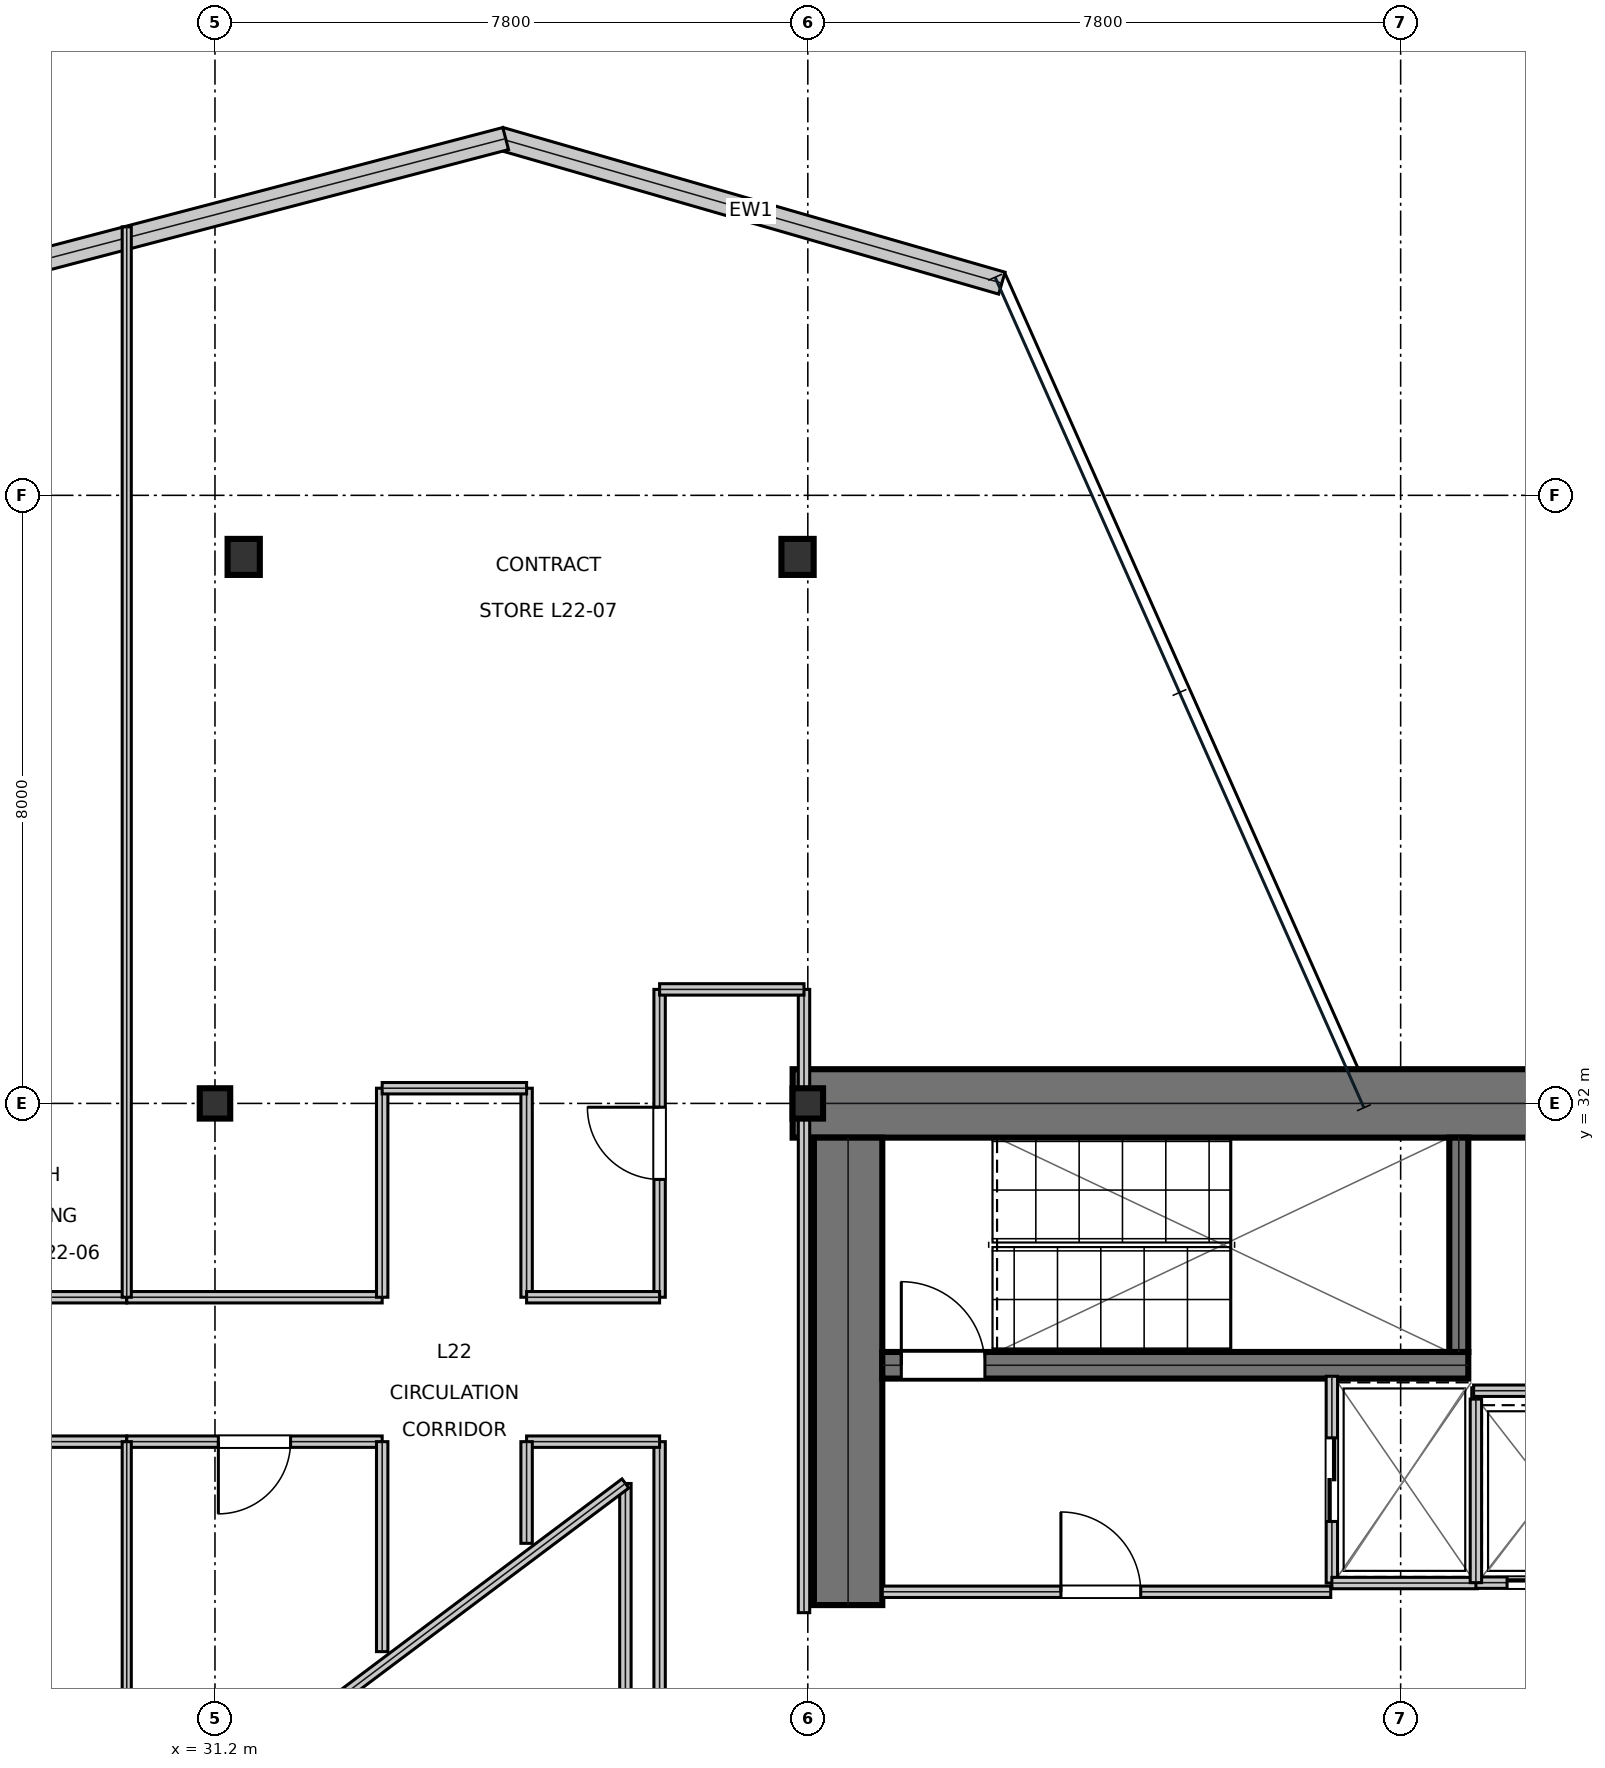
"""IFC4 building model, lengths in metres.
Left out: names, types, materials, properties, quantities, classifications, styles, units other than length and angle.
Written with IfcOpenShell. Run it as: python <this file> out.ifc"""

import sys

from ifc_helpers import new_model, si_unit, direction, frame, frame_2d, origin, origin_2d, place, context, subcontext, project, spatial, rectangle, i_section, extrude, element, fill, save


model = new_model("IFC4")
c1 = context("Model", 3, precision=1e-05, world=origin(), true_north=direction((0.0, 1.0)))
c2 = subcontext(c1, "Body", "Model", "MODEL_VIEW")
j1 = project(units=[si_unit("LENGTHUNIT", "METRE"), si_unit("PLANEANGLEUNIT", "RADIAN")], contexts=[c1])
p1 = place(None, origin())
s1 = spatial("IfcSite", under=j1, at=p1, CompositionType="ELEMENT")
p2 = place(p1, origin())
s2 = spatial("IfcBuilding", under=s1, at=p2, CompositionType="ELEMENT")
p3 = place(p2, frame((0.0, 0.0, 98.55)))
s3 = spatial("IfcBuildingStorey", under=s2, at=p3, CompositionType="ELEMENT", Elevation=98.55)
p4 = place(p3, frame((38.8, 32.0, 0.0), z_axis=(0.0, 0.0, 1.0), x_axis=(1.0, 0.0, 0.0)))
e1 = element("IfcWall", 1, at=p4, inside=s3, PredefinedType="SHEAR", context=c2, shape_type="SweptSolid", body=[
    extrude(rectangle(XDim=16.0, YDim=0.9, at=frame_2d((8.0, 0.0))), origin(), (0.0, 0.0, 1.0), 3.81),
])
p5 = place(p3, frame((39.53, 25.4, 0.0), z_axis=(0.0, 0.0, 1.0), x_axis=(0.0, 1.0, 0.0)))
e2 = element("IfcWall", 2, at=p5, inside=s3, PredefinedType="SHEAR", context=c2, shape_type="SweptSolid", body=[
    extrude(rectangle(XDim=6.15, YDim=0.9, at=frame_2d((3.075, 0.0))), origin(), (0.0, 0.0, 1.0), 3.81),
])
p6 = place(p3, frame((39.98, 28.555, 0.0), z_axis=(0.0, 0.0, 1.0), x_axis=(1.0, 0.0, 0.0)))
e3 = element("IfcWall", 3, at=p6, inside=s3, PredefinedType="SHEAR", context=c2, shape_type="SweptSolid", body=[
    extrude(rectangle(XDim=7.71, YDim=0.35, at=frame_2d((3.855, 0.0))), origin(), (0.0, 0.0, 1.0), 3.81),
])
p7 = place(p6, frame((0.25, 0.0, 0.0)))
e4 = element("IfcOpeningElement", 4, at=p7, cuts=e3, PredefinedType="OPENING", context=c2, shape_type="SweptSolid", body=[
    extrude(rectangle(XDim=1.1, YDim=2.15, at=frame_2d((0.55, 1.075))), frame((0.0, 0.185, 0.0), z_axis=(0.0, -1.0, 0.0), x_axis=(1.0, 0.0, 0.0)), (0.0, 0.0, 1.0), 0.37),
])
p8 = place(p3, frame((47.565, 28.73, 0.0), z_axis=(0.0, 0.0, 1.0), x_axis=(0.0, 1.0, 0.0)))
e5 = element("IfcWall", 5, at=p8, inside=s3, PredefinedType="SHEAR", context=c2, shape_type="SweptSolid", body=[
    extrude(rectangle(XDim=2.82, YDim=0.25, at=frame_2d((1.41, 0.0))), origin(), (0.0, 0.0, 1.0), 3.81),
])
for number, where, z_axis, x_axis in (
    (6, (31.2, 32.0, 0.0), (0.0, 0.0, 1.0), (1.0, 0.0, 0.0)),
    (7, (39.0, 32.0, 0.0), (0.0, 0.0, 1.0), (1.0, 0.0, 0.0)),
):
    element("IfcColumn", number, at=place(p3, frame(where, z_axis=z_axis, x_axis=x_axis)), inside=s3, PredefinedType="COLUMN", context=c2, shape_type="SweptSolid", body=[
        extrude(i_section(OverallWidth=0.401, OverallDepth=0.399, WebThickness=0.025, FlangeThickness=0.04, at=origin_2d()), origin(), (0.0, 0.0, 1.0), 4.044),
    ])
p9 = place(p3, frame((31.578, 39.19, 0.016), z_axis=(0.010508398304, -0.022353124715, 0.99969490915), x_axis=(0.90498583022, 0.425441708229, 0.0)))
e8 = element("IfcColumn", 8, at=p9, inside=s3, PredefinedType="COLUMN", context=c2, shape_type="SweptSolid", body=[
    extrude(i_section(OverallWidth=0.424, OverallDepth=0.474, WebThickness=0.048, FlangeThickness=0.077, at=origin_2d()), origin(), (0.0, 0.0, 1.0), 4.019),
])
p10 = place(p3, frame((38.865, 39.19, 0.016), z_axis=(-0.003705452548, -0.022354205538, 0.999743246597), x_axis=(0.986538449348, -0.163529471223, 0.0)))
e9 = element("IfcColumn", 9, at=p10, inside=s3, PredefinedType="COLUMN", context=c2, shape_type="SweptSolid", body=[
    extrude(i_section(OverallWidth=0.424, OverallDepth=0.474, WebThickness=0.048, FlangeThickness=0.077, at=origin_2d()), origin(), (0.0, 0.0, 1.0), 4.019),
])
p11 = place(p3, frame((41.553, 42.792, 0.0), z_axis=(0.0, 0.0, 1.0), x_axis=(-0.960887246738, 0.27693988347, 0.0)))
e10 = element("IfcWall", 10, at=p11, inside=s3, PredefinedType="STANDARD", context=c2, shape_type="SweptSolid", body=[
    extrude(rectangle(XDim=6.872, YDim=0.3, at=frame_2d((3.436, 0.0))), origin(), (0.0, 0.0, 1.0), 3.81),
])
p12 = place(p3, frame((35.024, 44.694, 0.0), z_axis=(0.0, 0.0, 1.0), x_axis=(-0.967350095479, -0.25344386514, 0.0)))
e11 = element("IfcWall", 11, at=p12, inside=s3, PredefinedType="STANDARD", context=c2, shape_type="SweptSolid", body=[
    extrude(rectangle(XDim=6.826, YDim=0.3, at=frame_2d((3.413, 0.0))), origin(), (0.0, 0.0, 1.0), 3.81),
])
p13 = place(p3, frame((39.98, 25.575, 0.0), z_axis=(0.0, 0.0, 1.0), x_axis=(1.0, 0.0, 0.0)))
e12 = element("IfcWall", 12, at=p13, inside=s3, PredefinedType="PARTITIONING", context=c2, shape_type="SweptSolid", body=[
    extrude(rectangle(XDim=5.9, YDim=0.15, at=frame_2d((2.95, 0.0))), origin(), (0.0, 0.0, 1.0), 3.81),
])
p14 = place(p13, frame((2.35, 0.0, 0.0)))
e13 = element("IfcOpeningElement", 13, at=p14, cuts=e12, PredefinedType="OPENING", context=c2, shape_type="SweptSolid", body=[
    extrude(rectangle(XDim=1.05, YDim=2.15, at=frame_2d((0.525, 1.075))), frame((0.0, 0.085, 0.0), z_axis=(0.0, -1.0, 0.0), x_axis=(1.0, 0.0, 0.0)), (0.0, 0.0, 1.0), 0.17),
])
p15 = place(p3, frame((45.895, 25.69, 0.0), z_axis=(0.0, 0.0, 1.0), x_axis=(0.0, 1.0, 0.0)))
e14 = element("IfcWall", 14, at=p15, inside=s3, PredefinedType="PARTITIONING", context=c2, shape_type="SweptSolid", body=[
    extrude(rectangle(XDim=2.72, YDim=0.15, at=frame_2d((1.36, 0.0))), origin(), (0.0, 0.0, 1.0), 3.81),
])
p16 = place(p15, frame((0.81, 0.0, 0.0)))
e15 = element("IfcOpeningElement", 15, at=p16, cuts=e14, PredefinedType="OPENING", context=c2, shape_type="SweptSolid", body=[
    extrude(rectangle(XDim=1.1, YDim=2.15, at=frame_2d((0.55, 1.075))), frame((0.0, 0.085, 0.0), z_axis=(0.0, -1.0, 0.0), x_axis=(1.0, 0.0, 0.0)), (0.0, 0.0, 1.0), 0.17),
])
p17 = place(p3, frame((45.895, 25.69, 0.0), z_axis=(0.0, 0.0, 1.0), x_axis=(1.0, 0.0, 0.0)))
e16 = element("IfcWall", 16, at=p17, inside=s3, PredefinedType="PARTITIONING", context=c2, shape_type="SweptSolid", body=[
    extrude(rectangle(XDim=1.915, YDim=0.15, at=frame_2d((0.958, 0.0))), origin(), (0.0, 0.0, 1.0), 3.81),
])
p18 = place(p3, frame((47.79, 25.695, 0.0), z_axis=(0.0, 0.0, 1.0), x_axis=(1.0, 0.0, 0.0)))
e17 = element("IfcWall", 17, at=p18, inside=s3, PredefinedType="PARTITIONING", context=c2, shape_type="SweptSolid", body=[
    extrude(rectangle(XDim=1.92, YDim=0.15, at=frame_2d((0.96, 0.0))), origin(), (0.0, 0.0, 1.0), 3.81),
])
p19 = place(p18, frame((0.41, 0.0, 0.0)))
e18 = element("IfcOpeningElement", 18, at=p19, cuts=e17, PredefinedType="OPENING", context=c2, shape_type="SweptSolid", body=[
    extrude(rectangle(XDim=1.1, YDim=2.15, at=frame_2d((0.55, 1.075))), frame((0.0, 0.085, 0.0), z_axis=(0.0, -1.0, 0.0), x_axis=(1.0, 0.0, 0.0)), (0.0, 0.0, 1.0), 0.17),
])
p20 = place(p3, frame((47.79, 25.695, 0.0), z_axis=(0.0, 0.0, 1.0), x_axis=(0.0, 1.0, 0.0)))
e19 = element("IfcWall", 19, at=p20, inside=s3, PredefinedType="PARTITIONING", context=c2, shape_type="SweptSolid", body=[
    extrude(rectangle(XDim=2.415, YDim=0.15, at=frame_2d((1.208, 0.0))), origin(), (0.0, 0.0, 1.0), 3.81),
])
p21 = place(p3, frame((47.76, 28.22, 0.0), z_axis=(0.0, 0.0, 1.0), x_axis=(1.0, 0.0, 0.0)))
e20 = element("IfcWall", 20, at=p21, inside=s3, PredefinedType="PARTITIONING", context=c2, shape_type="SweptSolid", body=[
    extrude(rectangle(XDim=1.96, YDim=0.15, at=frame_2d((0.98, 0.0))), origin(), (0.0, 0.0, 1.0), 3.81),
])
p22 = place(p3, frame((37.05, 14.5, 0.0), z_axis=(0.0, 0.0, 1.0), x_axis=(0.0, 1.0, 0.0)))
e21 = element("IfcWall", 21, at=p22, inside=s3, PredefinedType="PARTITIONING", context=c2, shape_type="SweptSolid", body=[
    extrude(rectangle(XDim=13.05, YDim=0.15, at=frame_2d((6.525, 0.0))), origin(), (0.0, 0.0, 1.0), 3.181),
])
p23 = place(p22, frame((4.61, 0.0, 0.0)))
e22 = element("IfcOpeningElement", 22, at=p23, cuts=e21, PredefinedType="OPENING", context=c2, shape_type="SweptSolid", body=[
    extrude(rectangle(XDim=0.95, YDim=2.15, at=frame_2d((0.475, 1.075))), frame((0.0, 0.085, 0.0), z_axis=(0.0, -1.0, 0.0), x_axis=(1.0, 0.0, 0.0)), (0.0, 0.0, 1.0), 0.17),
])
p24 = place(p3, frame((21.4, 27.55, 0.0), z_axis=(0.0, 0.0, 1.0), x_axis=(1.0, 0.0, 0.0)))
e23 = element("IfcWall", 23, at=p24, inside=s3, PredefinedType="PARTITIONING", context=c2, shape_type="SweptSolid", body=[
    extrude(rectangle(XDim=8.639, YDim=0.15, at=frame_2d((4.32, 0.0))), origin(), (0.0, 0.0, 1.0), 3.391),
])
p25 = place(p24, frame((3.844, 0.0, 0.0)))
e24 = element("IfcOpeningElement", 24, at=p25, cuts=e23, PredefinedType="OPENING", context=c2, shape_type="SweptSolid", body=[
    extrude(rectangle(XDim=0.95, YDim=2.15, at=frame_2d((0.475, 1.075))), frame((0.0, 0.085, 0.0), z_axis=(0.0, -1.0, 0.0), x_axis=(1.0, 0.0, 0.0)), (0.0, 0.0, 1.0), 0.17),
])
p26 = place(p3, frame((30.039, 27.55, 0.0), z_axis=(0.0, 0.0, 1.0), x_axis=(1.0, 0.0, 0.0)))
e25 = element("IfcWall", 25, at=p26, inside=s3, PredefinedType="PARTITIONING", context=c2, shape_type="SweptSolid", body=[
    extrude(rectangle(XDim=3.361, YDim=0.15, at=frame_2d((1.68, 0.0))), origin(), (0.0, 0.0, 1.0), 3.181),
])
p27 = place(p26, frame((1.206, 0.0, 0.0)))
e26 = element("IfcOpeningElement", 26, at=p27, cuts=e25, PredefinedType="OPENING", context=c2, shape_type="SweptSolid", body=[
    extrude(rectangle(XDim=0.95, YDim=2.15, at=frame_2d((0.475, 1.075))), frame((0.0, 0.085, 0.0), z_axis=(0.0, -1.0, 0.0), x_axis=(1.0, 0.0, 0.0)), (0.0, 0.0, 1.0), 0.17),
])
p28 = place(p3, frame((16.662, 29.45, 0.0), z_axis=(0.0, 0.0, 1.0), x_axis=(1.0, 0.0, 0.0)))
e27 = element("IfcWall", 27, at=p28, inside=s3, PredefinedType="PARTITIONING", context=c2, shape_type="SweptSolid", body=[
    extrude(rectangle(XDim=13.377, YDim=0.15, at=frame_2d((6.689, 0.0))), origin(), (0.0, 0.0, 1.0), 3.338),
])
p29 = place(p28, frame((10.174, 0.0, 0.0)))
e28 = element("IfcOpeningElement", 28, at=p29, cuts=e27, PredefinedType="OPENING", context=c2, shape_type="SweptSolid", body=[
    extrude(rectangle(XDim=0.95, YDim=2.15, at=frame_2d((0.475, 1.075))), frame((0.0, 0.085, 0.0), z_axis=(0.0, -1.0, 0.0), x_axis=(1.0, 0.0, 0.0)), (0.0, 0.0, 1.0), 0.17),
])
p30 = place(p3, frame((37.05, 29.45, 0.0), z_axis=(0.0, 0.0, 1.0), x_axis=(0.0, 1.0, 0.0)))
e29 = element("IfcWall", 29, at=p30, inside=s3, PredefinedType="PARTITIONING", context=c2, shape_type="SweptSolid", body=[
    extrude(rectangle(XDim=4.05, YDim=0.15, at=frame_2d((2.025, 0.0))), origin(), (0.0, 0.0, 1.0), 3.181),
])
p31 = place(p30, frame((1.55, 0.0, 0.0)))
e30 = element("IfcOpeningElement", 30, at=p31, cuts=e29, PredefinedType="OPENING", context=c2, shape_type="SweptSolid", body=[
    extrude(rectangle(XDim=0.95, YDim=2.15, at=frame_2d((0.475, 1.075))), frame((0.0, 0.085, 0.0), z_axis=(0.0, -1.0, 0.0), x_axis=(1.0, 0.0, 0.0)), (0.0, 0.0, 1.0), 0.17),
])
p32 = place(p3, frame((35.3, 27.55, 0.0), z_axis=(0.0, 0.0, 1.0), x_axis=(1.0, 0.0, 0.0)))
e31 = element("IfcWall", 31, at=p32, inside=s3, PredefinedType="PARTITIONING", context=c2, shape_type="SweptSolid", body=[
    extrude(rectangle(XDim=1.75, YDim=0.15, at=frame_2d((0.875, 0.0))), origin(), (0.0, 0.0, 1.0), 3.391),
])
p33 = place(p3, frame((35.3, 26.212, 0.0), z_axis=(0.0, 0.0, 1.0), x_axis=(0.0, 1.0, 0.0)))
e32 = element("IfcWall", 32, at=p33, inside=s3, PredefinedType="PARTITIONING", context=c2, shape_type="SweptSolid", body=[
    extrude(rectangle(XDim=1.338, YDim=0.15, at=frame_2d((0.669, 0.0))), origin(), (0.0, 0.0, 1.0), 3.81),
])
p34 = place(p3, frame((33.4, 24.788, 0.0), z_axis=(0.0, 0.0, 1.0), x_axis=(0.0, 1.0, 0.0)))
e33 = element("IfcWall", 33, at=p34, inside=s3, PredefinedType="PARTITIONING", context=c2, shape_type="SweptSolid", body=[
    extrude(rectangle(XDim=2.762, YDim=0.15, at=frame_2d((1.381, 0.0))), origin(), (0.0, 0.0, 1.0), 3.81),
])
p35 = place(p3, frame((38.95, 25.3, 0.0), z_axis=(0.0, 0.0, 1.0), x_axis=(0.0, 1.0, 0.0)))
e34 = element("IfcWall", 34, at=p35, inside=s3, PredefinedType="PARTITIONING", context=c2, shape_type="SweptSolid", body=[
    extrude(rectangle(XDim=8.2, YDim=0.15, at=frame_2d((4.1, 0.0))), origin(), (0.0, 0.0, 1.0), 3.181),
])
p36 = place(p3, frame((30.039, 29.45, 0.0), z_axis=(0.0, 0.0, 1.0), x_axis=(1.0, 0.0, 0.0)))
e35 = element("IfcWall", 35, at=p36, inside=s3, PredefinedType="PARTITIONING", context=c2, shape_type="SweptSolid", body=[
    extrude(rectangle(XDim=3.361, YDim=0.15, at=frame_2d((1.68, 0.0))), origin(), (0.0, 0.0, 1.0), 3.181),
])
for number, where, z_axis, x_axis in (
    (36, (33.4, 29.45, 0.0), (0.0, 0.0, 1.0), (0.0, 1.0, 0.0)),
    (37, (35.3, 29.45, 0.0), (0.0, 0.0, 1.0), (0.0, 1.0, 0.0)),
):
    element("IfcWall", number, at=place(p3, frame(where, z_axis=z_axis, x_axis=x_axis)), inside=s3, PredefinedType="PARTITIONING", context=c2, shape_type="SweptSolid", body=[
        extrude(rectangle(XDim=2.75, YDim=0.15, at=frame_2d((1.375, 0.0))), origin(), (0.0, 0.0, 1.0), 3.181),
    ])
p37 = place(p3, frame((37.05, 33.5, 0.0), z_axis=(0.0, 0.0, 1.0), x_axis=(1.0, 0.0, 0.0)))
e38 = element("IfcWall", 38, at=p37, inside=s3, PredefinedType="PARTITIONING", context=c2, shape_type="SweptSolid", body=[
    extrude(rectangle(XDim=1.9, YDim=0.15, at=frame_2d((0.95, 0.0))), origin(), (0.0, 0.0, 1.0), 3.181),
])
p38 = place(p3, frame((33.4, 32.2, 0.0), z_axis=(0.0, 0.0, 1.0), x_axis=(1.0, 0.0, 0.0)))
e39 = element("IfcWall", 39, at=p38, inside=s3, PredefinedType="PARTITIONING", context=c2, shape_type="SweptSolid", body=[
    extrude(rectangle(XDim=1.9, YDim=0.15, at=frame_2d((0.95, 0.0))), origin(), (0.0, 0.0, 1.0), 3.181),
])
p39 = place(p3, frame((35.3, 29.45, 0.0), z_axis=(0.0, 0.0, 1.0), x_axis=(1.0, 0.0, 0.0)))
e40 = element("IfcWall", 40, at=p39, inside=s3, PredefinedType="PARTITIONING", context=c2, shape_type="SweptSolid", body=[
    extrude(rectangle(XDim=1.75, YDim=0.15, at=frame_2d((0.875, 0.0))), origin(), (0.0, 0.0, 1.0), 3.81),
])
p40 = place(p3, frame((30.039, 20.45, 0.0), z_axis=(0.0, 0.0, 1.0), x_axis=(0.0, 1.0, 0.0)))
e41 = element("IfcWall", 41, at=p40, inside=s3, PredefinedType="PARTITIONING", context=c2, shape_type="SweptSolid", body=[
    extrude(rectangle(XDim=7.1, YDim=0.12, at=frame_2d((3.55, 0.0))), origin(), (0.0, 0.0, 1.0), 3.181),
])
p41 = place(p3, frame((30.039, 29.45, 0.0), z_axis=(0.0, 0.0, 1.0), x_axis=(0.0, 1.0, 0.0)))
e42 = element("IfcWall", 42, at=p41, inside=s3, PredefinedType="PARTITIONING", context=c2, shape_type="SweptSolid", body=[
    extrude(rectangle(XDim=14.082, YDim=0.12, at=frame_2d((7.041, 0.0))), origin(), (0.0, 0.0, 1.0), 3.338),
])
p42 = place(p3, frame((36.6, 21.0, 0.0), z_axis=(0.0, 0.0, 1.0), x_axis=(0.0, 1.0, 0.0)))
e43 = element("IfcWall", 43, at=p42, inside=s3, PredefinedType="MOVABLE", context=c2, shape_type="SweptSolid", body=[
    extrude(rectangle(XDim=6.0, YDim=0.15, at=frame_2d((3.0, 0.0))), origin(), (0.0, 0.0, 1.0), 3.81),
])
p43 = place(p3, frame((36.6, 27.0, 0.0), z_axis=(0.0, 0.0, 1.0), x_axis=(-0.8, -0.6, 0.0)))
e44 = element("IfcWall", 44, at=p43, inside=s3, PredefinedType="MOVABLE", context=c2, shape_type="SweptSolid", body=[
    extrude(rectangle(XDim=5.0, YDim=0.15, at=frame_2d((2.5, 0.0))), origin(), (0.0, 0.0, 1.0), 3.81),
])
p44 = place(p14, origin())
e45 = element("IfcDoor", 45, at=p44, inside=s3, OperationType="SINGLE_SWING_LEFT", PredefinedType="DOOR", context=c2, shape_type="SweptSolid", body=[
    extrude(rectangle(XDim=1.05, YDim=2.15, at=frame_2d((0.525, 1.075))), frame((0.0, 0.025, 0.0), z_axis=(0.0, -1.0, 0.0), x_axis=(1.0, 0.0, 0.0)), (0.0, 0.0, 1.0), 0.05),
])
fill(e13, e45)
p45 = place(p16, frame((1.1, 0.0, 0.0), z_axis=(0.0, 0.0, 1.0), x_axis=(-1.0, 0.0, 0.0)))
e46 = element("IfcDoor", 46, at=p45, inside=s3, OperationType="DOUBLE_DOOR_SLIDING", PredefinedType="DOOR", context=c2, shape_type="SweptSolid", body=[
    extrude(rectangle(XDim=1.1, YDim=2.15, at=frame_2d((0.55, 1.075))), frame((0.0, 0.025, 0.0), z_axis=(0.0, -1.0, 0.0), x_axis=(1.0, 0.0, 0.0)), (0.0, 0.0, 1.0), 0.05),
])
fill(e15, e46)
p46 = place(p19, frame((1.1, 0.0, 0.0), z_axis=(0.0, 0.0, 1.0), x_axis=(-1.0, 0.0, 0.0)))
e47 = element("IfcDoor", 47, at=p46, inside=s3, OperationType="DOUBLE_DOOR_SLIDING", PredefinedType="DOOR", context=c2, shape_type="SweptSolid", body=[
    extrude(rectangle(XDim=1.1, YDim=2.15, at=frame_2d((0.55, 1.075))), frame((0.0, 0.025, 0.0), z_axis=(0.0, -1.0, 0.0), x_axis=(1.0, 0.0, 0.0)), (0.0, 0.0, 1.0), 0.05),
])
fill(e18, e47)
p47 = place(p27, frame((0.95, 0.0, 0.0), z_axis=(0.0, 0.0, 1.0), x_axis=(-1.0, 0.0, 0.0)))
e48 = element("IfcDoor", 48, at=p47, inside=s3, OperationType="SINGLE_SWING_RIGHT", PredefinedType="DOOR", context=c2, shape_type="SweptSolid", body=[
    extrude(rectangle(XDim=0.95, YDim=2.15, at=frame_2d((0.475, 1.075))), frame((0.0, 0.025, 0.0), z_axis=(0.0, -1.0, 0.0), x_axis=(1.0, 0.0, 0.0)), (0.0, 0.0, 1.0), 0.05),
])
fill(e26, e48)
p48 = place(p31, origin())
e49 = element("IfcDoor", 49, at=p48, inside=s3, OperationType="SINGLE_SWING_RIGHT", PredefinedType="DOOR", context=c2, shape_type="SweptSolid", body=[
    extrude(rectangle(XDim=0.95, YDim=2.15, at=frame_2d((0.475, 1.075))), frame((0.0, 0.025, 0.0), z_axis=(0.0, -1.0, 0.0), x_axis=(1.0, 0.0, 0.0)), (0.0, 0.0, 1.0), 0.05),
])
fill(e30, e49)
p49 = place(p7, origin())
e50 = element("IfcDoor", 50, at=p49, inside=s3, OperationType="SINGLE_SWING_LEFT", PredefinedType="DOOR", context=c2, shape_type="SweptSolid", body=[
    extrude(rectangle(XDim=1.1, YDim=2.15, at=frame_2d((0.55, 1.075))), frame((0.0, 0.025, 0.0), z_axis=(0.0, -1.0, 0.0), x_axis=(1.0, 0.0, 0.0)), (0.0, 0.0, 1.0), 0.05),
])
fill(e4, e50)
save(model, sys.argv[1])
